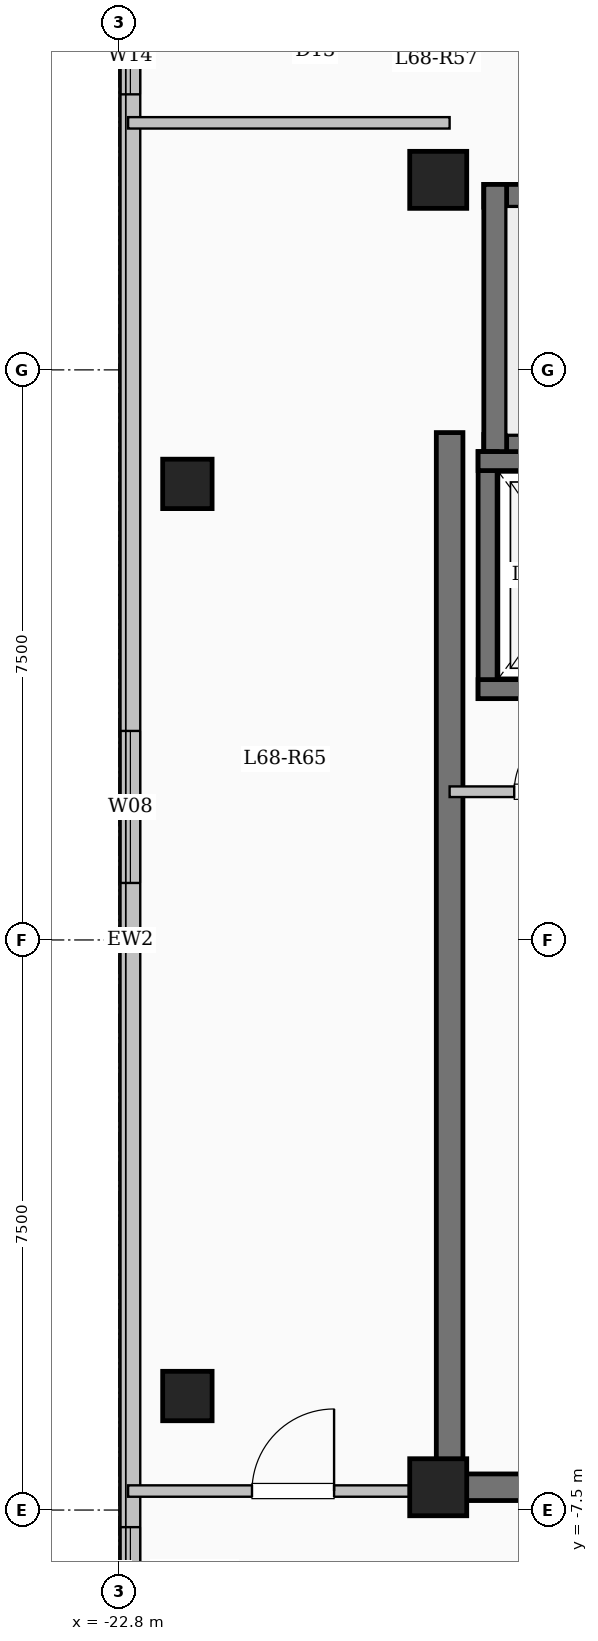
"""IFC4 building model, lengths in metres.
Left out: names, types, materials, properties, quantities, classifications, styles, units other than length and angle.
Written with IfcOpenShell. Run it as: python <this file> out.ifc"""

import sys

from ifc_helpers import new_model, si_unit, direction, frame, frame_2d, origin, origin_2d, place, context, subcontext, project, spatial, rectangle, extrude, element, fill, save


model = new_model("IFC4")
c1 = context("Model", 3, precision=1e-05, world=origin(), true_north=direction((0.0, 1.0)))
c2 = subcontext(c1, "Body", "Model", "MODEL_VIEW")
j1 = project(units=[si_unit("LENGTHUNIT", "METRE"), si_unit("PLANEANGLEUNIT", "RADIAN")], contexts=[c1])
p1 = place(None, origin())
s1 = spatial("IfcSite", under=j1, at=p1, CompositionType="ELEMENT")
p2 = place(p1, origin())
s2 = spatial("IfcBuilding", under=s1, at=p2, CompositionType="ELEMENT")
p3 = place(p2, frame((0.0, 0.0, 251.55)))
s3 = spatial("IfcBuildingStorey", under=s2, at=p3, CompositionType="ELEMENT", Elevation=251.55)
for number, where, z_axis, x_axis in (
    (1, (-18.6, -7.2, 0.0), (0.0, 0.0, 1.0), (1.0, 0.0, 0.0)),
    (2, (-18.6, 10.0, 0.0), (0.0, 0.0, 1.0), (1.0, 0.0, 0.0)),
):
    element("IfcColumn", number, at=place(p3, frame(where, z_axis=z_axis, x_axis=x_axis)), inside=s3, PredefinedType="COLUMN", context=c2, shape_type="SweptSolid", body=[
        extrude(rectangle(XDim=0.75, YDim=0.75, at=origin_2d()), origin(), (0.0, 0.0, 1.0), 3.35),
    ])
for number, where, z_axis, x_axis in (
    (3, (-21.9, -6.0, 0.0), (0.0, 0.0, 1.0), (1.0, 0.0, 0.0)),
    (4, (-21.9, 6.0, 0.0), (0.0, 0.0, 1.0), (1.0, 0.0, 0.0)),
):
    element("IfcColumn", number, at=place(p3, frame(where, z_axis=z_axis, x_axis=x_axis)), inside=s3, PredefinedType="COLUMN", context=c2, shape_type="SweptSolid", body=[
        extrude(rectangle(XDim=0.65, YDim=0.65, at=origin_2d()), origin(), (0.0, 0.0, 1.0), 3.35),
    ])
p4 = place(p3, frame((-22.65, -17.55, 0.0), z_axis=(0.0, 0.0, 1.0), x_axis=(0.0, 1.0, 0.0)))
e5 = element("IfcWall", 5, at=p4, inside=s3, PredefinedType="SOLIDWALL", context=c2, shape_type="SweptSolid", body=[
    extrude(rectangle(XDim=35.1, YDim=0.26, at=frame_2d((17.55, 0.0))), origin(), (0.0, 0.0, 1.0), 3.1),
])
p5 = place(p4, frame((2.975, 0.0, 0.9)))
e6 = element("IfcOpeningElement", 6, at=p5, cuts=e5, PredefinedType="OPENING", context=c2, shape_type="SweptSolid", body=[
    extrude(rectangle(XDim=2.2, YDim=1.75, at=frame_2d((1.1, 0.875))), frame((0.0, 0.14, 0.0), z_axis=(0.0, -1.0, 0.0), x_axis=(1.0, 0.0, 0.0)), (0.0, 0.0, 1.0), 0.28),
])
p6 = place(p4, frame((8.625, 0.0, 0.95)))
e7 = element("IfcOpeningElement", 7, at=p6, cuts=e5, PredefinedType="OPENING", context=c2, shape_type="SweptSolid", body=[
    extrude(rectangle(XDim=1.2, YDim=1.5, at=frame_2d((0.6, 0.75))), frame((0.0, 0.14, 0.0), z_axis=(0.0, -1.0, 0.0), x_axis=(1.0, 0.0, 0.0)), (0.0, 0.0, 1.0), 0.28),
])
p7 = place(p4, frame((18.3, 0.0, 0.9)))
e8 = element("IfcOpeningElement", 8, at=p7, cuts=e5, PredefinedType="OPENING", context=c2, shape_type="SweptSolid", body=[
    extrude(rectangle(XDim=2.0, YDim=1.7, at=frame_2d((1.0, 0.85))), frame((0.0, 0.14, 0.0), z_axis=(0.0, -1.0, 0.0), x_axis=(1.0, 0.0, 0.0)), (0.0, 0.0, 1.0), 0.28),
])
p8 = place(p4, frame((28.675, 0.0, 0.95)))
e9 = element("IfcOpeningElement", 9, at=p8, cuts=e5, PredefinedType="OPENING", context=c2, shape_type="SweptSolid", body=[
    extrude(rectangle(XDim=1.0, YDim=1.5, at=frame_2d((0.5, 0.75))), frame((0.0, 0.14, 0.0), z_axis=(0.0, -1.0, 0.0), x_axis=(1.0, 0.0, 0.0)), (0.0, 0.0, 1.0), 0.28),
])
p9 = place(p4, frame((31.6, 0.0, 0.9)))
e10 = element("IfcOpeningElement", 10, at=p9, cuts=e5, PredefinedType="OPENING", context=c2, shape_type="SweptSolid", body=[
    extrude(rectangle(XDim=2.0, YDim=1.7, at=frame_2d((1.0, 0.85))), frame((0.0, 0.14, 0.0), z_axis=(0.0, -1.0, 0.0), x_axis=(1.0, 0.0, 0.0)), (0.0, 0.0, 1.0), 0.28),
])
p10 = place(p3, frame((-18.0, 9.79, 0.0), z_axis=(0.0, 0.0, 1.0), x_axis=(1.0, 0.0, 0.0)))
e11 = element("IfcWall", 11, at=p10, inside=s3, PredefinedType="SHEAR", context=c2, shape_type="SweptSolid", body=[
    extrude(rectangle(XDim=8.0, YDim=0.3, at=frame_2d((4.0, 0.0))), origin(), (0.0, 0.0, 1.0), 3.35),
])
p11 = place(p3, frame((-18.0, 6.5, 0.0), z_axis=(0.0, 0.0, 1.0), x_axis=(1.0, 0.0, 0.0)))
e12 = element("IfcWall", 12, at=p11, inside=s3, PredefinedType="SHEAR", context=c2, shape_type="SweptSolid", body=[
    extrude(rectangle(XDim=8.0, YDim=0.3, at=frame_2d((4.0, 0.0))), origin(), (0.0, 0.0, 1.0), 3.35),
])
p12 = place(p11, frame((6.45, 0.0, 0.0)))
e13 = element("IfcOpeningElement", 13, at=p12, cuts=e12, PredefinedType="OPENING", context=c2, shape_type="SweptSolid", body=[
    extrude(rectangle(XDim=1.0, YDim=2.15, at=frame_2d((0.5, 1.075))), frame((0.0, 0.16, 0.0), z_axis=(0.0, -1.0, 0.0), x_axis=(1.0, 0.0, 0.0)), (0.0, 0.0, 1.0), 0.32),
])
p13 = place(p3, frame((-17.85, 6.35, 0.0), z_axis=(0.0, 0.0, 1.0), x_axis=(0.0, 1.0, 0.0)))
e14 = element("IfcWall", 14, at=p13, inside=s3, PredefinedType="SHEAR", context=c2, shape_type="SweptSolid", body=[
    extrude(rectangle(XDim=3.59, YDim=0.3, at=frame_2d((1.795, 0.0))), origin(), (0.0, 0.0, 1.0), 3.35),
])
p14 = place(p3, frame((-17.95, 3.175, 0.0), z_axis=(0.0, 0.0, 1.0), x_axis=(0.0, 1.0, 0.0)))
e15 = element("IfcWall", 15, at=p14, inside=s3, PredefinedType="SHEAR", context=c2, shape_type="SweptSolid", body=[
    extrude(rectangle(XDim=3.25, YDim=0.25, at=frame_2d((1.625, 0.0))), origin(), (0.0, 0.0, 1.0), 3.35),
])
for number, where, z_axis, x_axis in (
    (16, (-18.075, 3.3, 0.0), (0.0, 0.0, 1.0), (1.0, 0.0, 0.0)),
    (17, (-18.075, 6.3, 0.0), (0.0, 0.0, 1.0), (1.0, 0.0, 0.0)),
):
    element("IfcWall", number, at=place(p3, frame(where, z_axis=z_axis, x_axis=x_axis)), inside=s3, PredefinedType="SHEAR", context=c2, shape_type="SweptSolid", body=[
        extrude(rectangle(XDim=2.55, YDim=0.25, at=frame_2d((1.275, 0.0))), origin(), (0.0, 0.0, 1.0), 3.35),
    ])
p15 = place(p3, frame((-18.45, -7.375, 0.0), z_axis=(0.0, 0.0, 1.0), x_axis=(0.0, 1.0, 0.0)))
e18 = element("IfcWall", 18, at=p15, inside=s3, PredefinedType="SHEAR", context=c2, shape_type="SweptSolid", body=[
    extrude(rectangle(XDim=14.05, YDim=0.35, at=frame_2d((7.025, 0.0))), origin(), (0.0, 0.0, 1.0), 3.35),
])
p16 = place(p3, frame((-18.625, -7.2, 0.0), z_axis=(0.0, 0.0, 1.0), x_axis=(1.0, 0.0, 0.0)))
e19 = element("IfcWall", 19, at=p16, inside=s3, PredefinedType="SHEAR", context=c2, shape_type="SweptSolid", body=[
    extrude(rectangle(XDim=8.55, YDim=0.35, at=frame_2d((4.275, 0.0))), origin(), (0.0, 0.0, 1.0), 3.35),
])
p17 = place(p16, frame((1.725, 0.0, 0.0)))
e20 = element("IfcOpeningElement", 20, at=p17, cuts=e19, PredefinedType="OPENING", context=c2, shape_type="SweptSolid", body=[
    extrude(rectangle(XDim=1.12, YDim=2.15, at=frame_2d((0.56, 1.075))), frame((0.0, 0.185, 0.0), z_axis=(0.0, -1.0, 0.0), x_axis=(1.0, 0.0, 0.0)), (0.0, 0.0, 1.0), 0.37),
])
p18 = place(p3, frame((-18.45, 1.95, 0.0), z_axis=(0.0, 0.0, 1.0), x_axis=(1.0, 0.0, 0.0)))
e21 = element("IfcWall", 21, at=p18, inside=s3, PredefinedType="PARTITIONING", context=c2, shape_type="SweptSolid", body=[
    extrude(rectangle(XDim=3.15, YDim=0.14, at=frame_2d((1.575, 0.0))), origin(), (0.0, 0.0, 1.0), 3.1),
])
p19 = place(p18, frame((0.85, 0.0, 0.0)))
e22 = element("IfcOpeningElement", 22, at=p19, cuts=e21, PredefinedType="OPENING", context=c2, shape_type="SweptSolid", body=[
    extrude(rectangle(XDim=0.9, YDim=2.08, at=frame_2d((0.45, 1.04))), frame((0.0, 0.08, 0.0), z_axis=(0.0, -1.0, 0.0), x_axis=(1.0, 0.0, 0.0)), (0.0, 0.0, 1.0), 0.16),
])
p20 = place(p3, frame((-22.68, -7.25, 0.0), z_axis=(0.0, 0.0, 1.0), x_axis=(1.0, 0.0, 0.0)))
e23 = element("IfcWall", 23, at=p20, inside=s3, PredefinedType="PARTITIONING", context=c2, shape_type="SweptSolid", body=[
    extrude(rectangle(XDim=4.23, YDim=0.15, at=frame_2d((2.115, 0.0))), origin(), (0.0, 0.0, 1.0), 3.1),
])
p21 = place(p20, frame((1.63, 0.0, 0.0)))
e24 = element("IfcOpeningElement", 24, at=p21, cuts=e23, PredefinedType="OPENING", context=c2, shape_type="SweptSolid", body=[
    extrude(rectangle(XDim=1.08, YDim=2.15, at=frame_2d((0.54, 1.075))), frame((0.0, 0.085, 0.0), z_axis=(0.0, -1.0, 0.0), x_axis=(1.0, 0.0, 0.0)), (0.0, 0.0, 1.0), 0.17),
])
p22 = place(p3, frame((-22.68, 10.75, 0.0), z_axis=(0.0, 0.0, 1.0), x_axis=(1.0, 0.0, 0.0)))
e25 = element("IfcWall", 25, at=p22, inside=s3, PredefinedType="PARTITIONING", context=c2, shape_type="SweptSolid", body=[
    extrude(rectangle(XDim=4.23, YDim=0.15, at=frame_2d((2.115, 0.0))), origin(), (0.0, 0.0, 1.0), 3.1),
])
p23 = place(p6, origin())
e26 = element("IfcWindow", 26, at=p23, inside=s3, PartitioningType="SINGLE_PANEL", PredefinedType="WINDOW", context=c2, shape_type="SweptSolid", body=[
    extrude(rectangle(XDim=1.2, YDim=1.5, at=frame_2d((0.6, 0.75))), frame((0.0, 0.03, 0.0), z_axis=(0.0, -1.0, 0.0), x_axis=(1.0, 0.0, 0.0)), (0.0, 0.0, 1.0), 0.06),
])
fill(e7, e26)
p24 = place(p7, origin())
e27 = element("IfcWindow", 27, at=p24, inside=s3, PartitioningType="SINGLE_PANEL", PredefinedType="WINDOW", context=c2, shape_type="SweptSolid", body=[
    extrude(rectangle(XDim=2.0, YDim=1.7, at=frame_2d((1.0, 0.85))), frame((0.0, 0.03, 0.0), z_axis=(0.0, -1.0, 0.0), x_axis=(1.0, 0.0, 0.0)), (0.0, 0.0, 1.0), 0.06),
])
fill(e8, e27)
p25 = place(p8, origin())
e28 = element("IfcWindow", 28, at=p25, inside=s3, PartitioningType="SINGLE_PANEL", PredefinedType="WINDOW", context=c2, shape_type="SweptSolid", body=[
    extrude(rectangle(XDim=1.0, YDim=1.5, at=frame_2d((0.5, 0.75))), frame((0.0, 0.03, 0.0), z_axis=(0.0, -1.0, 0.0), x_axis=(1.0, 0.0, 0.0)), (0.0, 0.0, 1.0), 0.06),
])
fill(e9, e28)
p26 = place(p19, origin())
e29 = element("IfcDoor", 29, at=p26, inside=s3, OperationType="SINGLE_SWING_RIGHT", PredefinedType="DOOR", context=c2, shape_type="SweptSolid", body=[
    extrude(rectangle(XDim=0.9, YDim=2.08, at=frame_2d((0.45, 1.04))), frame((0.0, 0.025, 0.0), z_axis=(0.0, -1.0, 0.0), x_axis=(1.0, 0.0, 0.0)), (0.0, 0.0, 1.0), 0.05),
])
fill(e22, e29)
p27 = place(p21, origin())
e30 = element("IfcDoor", 30, at=p27, inside=s3, OperationType="SINGLE_SWING_RIGHT", PredefinedType="DOOR", context=c2, shape_type="SweptSolid", body=[
    extrude(rectangle(XDim=1.08, YDim=2.15, at=frame_2d((0.54, 1.075))), frame((0.0, 0.025, 0.0), z_axis=(0.0, -1.0, 0.0), x_axis=(1.0, 0.0, 0.0)), (0.0, 0.0, 1.0), 0.05),
])
fill(e24, e30)
save(model, sys.argv[1])
